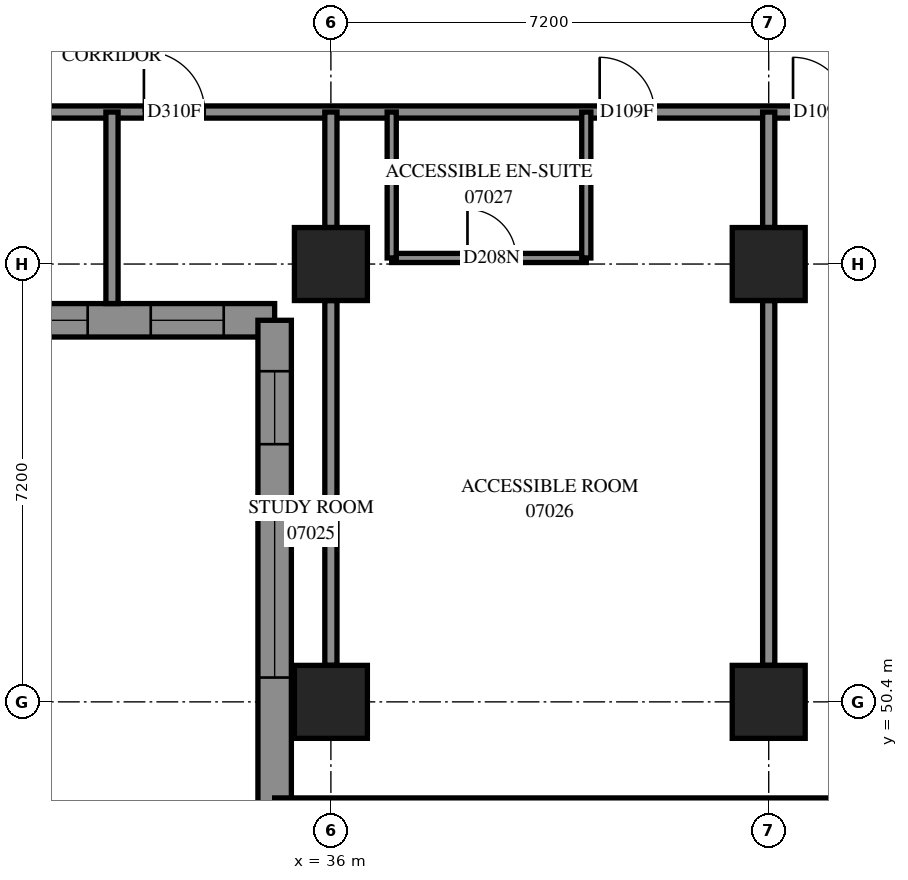
"""IFC4 building model, lengths in metres.
Left out: names, types, materials, properties, quantities, classifications, styles, units other than length and angle.
Written with IfcOpenShell. Run it as: python <this file> out.ifc"""

import sys

from ifc_helpers import new_model, si_unit, direction, frame, frame_2d, origin, origin_2d, place, context, subcontext, project, spatial, polyline, rectangle, outline, extrude, element, fill, save


model = new_model("IFC4")
c1 = context("Model", 3, precision=1e-05, world=origin(), true_north=direction((0.0, 1.0)))
c2 = subcontext(c1, "Body", "Model", "MODEL_VIEW")
j1 = project(units=[si_unit("LENGTHUNIT", "METRE"), si_unit("PLANEANGLEUNIT", "RADIAN")], contexts=[c1])
p1 = place(None, origin())
s1 = spatial("IfcSite", under=j1, at=p1, CompositionType="ELEMENT")
p2 = place(p1, origin())
s2 = spatial("IfcBuilding", under=s1, at=p2, CompositionType="ELEMENT")
p3 = place(p2, frame((0.0, 0.0, 30.4)))
s3 = spatial("IfcBuildingStorey", under=s2, at=p3, CompositionType="ELEMENT", Elevation=30.4)
for number, where, z_axis, x_axis in (
    (1, (36.0, 50.4, 0.0), (0.0, 0.0, 1.0), (1.0, 0.0, 0.0)),
    (2, (36.0, 57.6, 0.0), (0.0, 0.0, 1.0), (1.0, 0.0, 0.0)),
    (3, (43.2, 50.4, 0.0), (0.0, 0.0, 1.0), (1.0, 0.0, 0.0)),
    (4, (43.2, 57.6, 0.0), (0.0, 0.0, 1.0), (1.0, 0.0, 0.0)),
):
    element("IfcColumn", number, at=place(p3, frame(where, z_axis=z_axis, x_axis=x_axis)), inside=s3, PredefinedType="COLUMN", context=c2, shape_type="SweptSolid", body=[
        extrude(rectangle(XDim=1.2, YDim=1.2, at=origin_2d()), origin(), (0.0, 0.0, 1.0), 3.1),
    ])
p4 = place(p3, frame((27.875, 56.675, 0.0), z_axis=(0.0, 0.0, 1.0), x_axis=(1.0, 0.0, 0.0)))
e5 = element("IfcWall", 5, at=p4, inside=s3, PredefinedType="SOLIDWALL", context=c2, shape_type="SweptSolid", body=[
    extrude(outline(polyline([(-0.275, -0.275), (6.925, -0.275), (7.475, 0.275), (0.275, 0.275), (-0.275, -0.275)])), origin(), (0.0, 0.0, 1.0), 3.1),
])
p5 = place(p4, frame((1.325, 0.0, 0.5)))
e6 = element("IfcOpeningElement", 6, at=p5, cuts=e5, PredefinedType="OPENING", context=c2, shape_type="SweptSolid", body=[
    extrude(rectangle(XDim=2.8, YDim=2.45, at=frame_2d((1.4, 1.225))), frame((0.0, 0.285, 0.0), z_axis=(0.0, -1.0, 0.0), x_axis=(1.0, 0.0, 0.0)), (0.0, 0.0, 1.0), 0.57),
])
p6 = place(p4, frame((5.162, 0.0, 0.5)))
e7 = element("IfcOpeningElement", 7, at=p6, cuts=e5, PredefinedType="OPENING", context=c2, shape_type="SweptSolid", body=[
    extrude(rectangle(XDim=1.2, YDim=2.45, at=frame_2d((0.6, 1.225))), frame((0.0, 0.285, 0.0), z_axis=(0.0, -1.0, 0.0), x_axis=(1.0, 0.0, 0.0)), (0.0, 0.0, 1.0), 0.57),
])
p7 = place(p3, frame((35.075, 56.675, 0.0), z_axis=(0.0, 0.0, 1.0), x_axis=(0.0, -1.0, 0.0)))
e8 = element("IfcWall", 8, at=p7, inside=s3, PredefinedType="SOLIDWALL", context=c2, shape_type="SweptSolid", body=[
    extrude(outline(polyline([(0.275, -0.275), (8.405, -0.275), (7.855, 0.275), (-0.275, 0.275), (0.275, -0.275)])), origin(), (0.0, 0.0, 1.0), 3.1),
])
p8 = place(p7, frame((3.075, 0.0, 0.5)))
e9 = element("IfcOpeningElement", 9, at=p8, cuts=e8, PredefinedType="OPENING", context=c2, shape_type="SweptSolid", body=[
    extrude(rectangle(XDim=2.8, YDim=2.45, at=frame_2d((1.4, 1.225))), frame((0.0, 0.285, 0.0), z_axis=(0.0, -1.0, 0.0), x_axis=(1.0, 0.0, 0.0)), (0.0, 0.0, 1.0), 0.57),
])
p9 = place(p7, frame((0.838, 0.0, 0.5)))
e10 = element("IfcOpeningElement", 10, at=p9, cuts=e8, PredefinedType="OPENING", context=c2, shape_type="SweptSolid", body=[
    extrude(rectangle(XDim=1.2, YDim=2.45, at=frame_2d((0.6, 1.225))), frame((0.0, 0.285, 0.0), z_axis=(0.0, -1.0, 0.0), x_axis=(1.0, 0.0, 0.0)), (0.0, 0.0, 1.0), 0.57),
])
p10 = place(p3, frame((35.075, 48.545, 0.0), z_axis=(0.0, 0.0, 1.0), x_axis=(1.0, 0.0, 0.0)))
e11 = element("IfcWall", 11, at=p10, inside=s3, PredefinedType="SOLIDWALL", context=c2, shape_type="SweptSolid", body=[
    extrude(outline(polyline([(-0.275, -0.275), (14.125, -0.275), (14.675, 0.275), (0.275, 0.275), (-0.275, -0.275)])), origin(), (0.0, 0.0, 1.0), 3.1),
])
p11 = place(p10, frame((1.325, 0.0, 0.5)))
e12 = element("IfcOpeningElement", 12, at=p11, cuts=e11, PredefinedType="OPENING", context=c2, shape_type="SweptSolid", body=[
    extrude(rectangle(XDim=2.8, YDim=2.45, at=frame_2d((1.4, 1.225))), frame((0.0, 0.285, 0.0), z_axis=(0.0, -1.0, 0.0), x_axis=(1.0, 0.0, 0.0)), (0.0, 0.0, 1.0), 0.57),
])
p12 = place(p10, frame((4.925, 0.0, 0.5)))
e13 = element("IfcOpeningElement", 13, at=p12, cuts=e11, PredefinedType="OPENING", context=c2, shape_type="SweptSolid", body=[
    extrude(rectangle(XDim=2.8, YDim=2.45, at=frame_2d((1.4, 1.225))), frame((0.0, 0.285, 0.0), z_axis=(0.0, -1.0, 0.0), x_axis=(1.0, 0.0, 0.0)), (0.0, 0.0, 1.0), 0.57),
])
p13 = place(p10, frame((8.275, 0.0, 0.5)))
e14 = element("IfcOpeningElement", 14, at=p13, cuts=e11, PredefinedType="OPENING", context=c2, shape_type="SweptSolid", body=[
    extrude(rectangle(XDim=2.8, YDim=2.45, at=frame_2d((1.4, 1.225))), frame((0.0, 0.285, 0.0), z_axis=(0.0, -1.0, 0.0), x_axis=(1.0, 0.0, 0.0)), (0.0, 0.0, 1.0), 0.57),
])
p14 = place(p10, frame((12.363, 0.0, 0.5)))
e15 = element("IfcOpeningElement", 15, at=p14, cuts=e11, PredefinedType="OPENING", context=c2, shape_type="SweptSolid", body=[
    extrude(rectangle(XDim=1.2, YDim=2.45, at=frame_2d((0.6, 1.225))), frame((0.0, 0.285, 0.0), z_axis=(0.0, -1.0, 0.0), x_axis=(1.0, 0.0, 0.0)), (0.0, 0.0, 1.0), 0.57),
])
p15 = place(p3, frame((28.8, 60.1, 0.0), z_axis=(0.0, 0.0, 1.0), x_axis=(1.0, 0.0, 0.0)))
e16 = element("IfcWall", 16, at=p15, inside=s3, PredefinedType="PARTITIONING", context=c2, shape_type="SweptSolid", body=[
    extrude(rectangle(XDim=24.1, YDim=0.2, at=frame_2d((12.05, 0.0))), origin(), (0.0, 0.0, 1.0), 3.1),
])
p16 = place(p15, frame((4.125, 0.0, 0.0)))
e17 = element("IfcOpeningElement", 17, at=p16, cuts=e16, PredefinedType="OPENING", context=c2, shape_type="SweptSolid", body=[
    extrude(rectangle(XDim=1.0, YDim=2.1, at=frame_2d((0.5, 1.05))), frame((0.0, 0.11, 0.0), z_axis=(0.0, -1.0, 0.0), x_axis=(1.0, 0.0, 0.0)), (0.0, 0.0, 1.0), 0.22),
])
p17 = place(p15, frame((11.62, 0.0, 0.0)))
e18 = element("IfcOpeningElement", 18, at=p17, cuts=e16, PredefinedType="OPENING", context=c2, shape_type="SweptSolid", body=[
    extrude(rectangle(XDim=0.9, YDim=2.1, at=frame_2d((0.45, 1.05))), frame((0.0, 0.11, 0.0), z_axis=(0.0, -1.0, 0.0), x_axis=(1.0, 0.0, 0.0)), (0.0, 0.0, 1.0), 0.22),
])
p18 = place(p15, frame((14.8, 0.0, 0.0)))
e19 = element("IfcOpeningElement", 19, at=p18, cuts=e16, PredefinedType="OPENING", context=c2, shape_type="SweptSolid", body=[
    extrude(rectangle(XDim=0.9, YDim=2.1, at=frame_2d((0.45, 1.05))), frame((0.0, 0.11, 0.0), z_axis=(0.0, -1.0, 0.0), x_axis=(1.0, 0.0, 0.0)), (0.0, 0.0, 1.0), 0.22),
])
p19 = place(p15, frame((18.835, 0.0, 0.0)))
e20 = element("IfcOpeningElement", 20, at=p19, cuts=e16, PredefinedType="OPENING", context=c2, shape_type="SweptSolid", body=[
    extrude(rectangle(XDim=1.0, YDim=2.1, at=frame_2d((0.5, 1.05))), frame((0.0, 0.11, 0.0), z_axis=(0.0, -1.0, 0.0), x_axis=(1.0, 0.0, 0.0)), (0.0, 0.0, 1.0), 0.22),
])
p20 = place(p15, frame((22.854, 0.0, 0.0)))
e21 = element("IfcOpeningElement", 21, at=p20, cuts=e16, PredefinedType="OPENING", context=c2, shape_type="SweptSolid", body=[
    extrude(rectangle(XDim=1.0, YDim=2.1, at=frame_2d((0.5, 1.05))), frame((0.0, 0.11, 0.0), z_axis=(0.0, -1.0, 0.0), x_axis=(1.0, 0.0, 0.0)), (0.0, 0.0, 1.0), 0.22),
])
p21 = place(p3, frame((36.0, 51.0, 0.0), z_axis=(0.0, 0.0, 1.0), x_axis=(0.0, 1.0, 0.0)))
e22 = element("IfcWall", 22, at=p21, inside=s3, PredefinedType="PARTITIONING", context=c2, shape_type="SweptSolid", body=[
    extrude(rectangle(XDim=6.0, YDim=0.2, at=frame_2d((3.0, 0.0))), origin(), (0.0, 0.0, 1.0), 2.6),
])
p22 = place(p3, frame((43.2, 51.0, 0.0), z_axis=(0.0, 0.0, 1.0), x_axis=(0.0, 1.0, 0.0)))
e23 = element("IfcWall", 23, at=p22, inside=s3, PredefinedType="PARTITIONING", context=c2, shape_type="SweptSolid", body=[
    extrude(rectangle(XDim=6.0, YDim=0.2, at=frame_2d((3.0, 0.0))), origin(), (0.0, 0.0, 1.0), 3.1),
])
p23 = place(p3, frame((37.0, 57.7, 0.0), z_axis=(0.0, 0.0, 1.0), x_axis=(1.0, 0.0, 0.0)))
e24 = element("IfcWall", 24, at=p23, inside=s3, PredefinedType="PARTITIONING", context=c2, shape_type="SweptSolid", body=[
    extrude(rectangle(XDim=3.2, YDim=0.15, at=frame_2d((1.6, 0.0))), origin(), (0.0, 0.0, 1.0), 3.1),
])
p24 = place(p23, frame((1.246, 0.0, 0.0)))
e25 = element("IfcOpeningElement", 25, at=p24, cuts=e24, PredefinedType="OPENING", context=c2, shape_type="SweptSolid", body=[
    extrude(rectangle(XDim=0.8, YDim=2.1, at=frame_2d((0.4, 1.05))), frame((0.0, 0.085, 0.0), z_axis=(0.0, -1.0, 0.0), x_axis=(1.0, 0.0, 0.0)), (0.0, 0.0, 1.0), 0.17),
])
p25 = place(p3, frame((32.4, 56.95, 0.0), z_axis=(0.0, 0.0, 1.0), x_axis=(0.0, 1.0, 0.0)))
e26 = element("IfcWall", 26, at=p25, inside=s3, PredefinedType="PARTITIONING", context=c2, shape_type="SweptSolid", body=[
    extrude(rectangle(XDim=3.15, YDim=0.2, at=frame_2d((1.575, 0.0))), origin(), (0.0, 0.0, 1.0), 3.1),
])
for number, where, z_axis, x_axis in (
    (27, (40.2, 57.7, 0.0), (0.0, 0.0, 1.0), (0.0, 1.0, 0.0)),
    (28, (37.0, 57.7, 0.0), (0.0, 0.0, 1.0), (0.0, 1.0, 0.0)),
):
    element("IfcWall", number, at=place(p3, frame(where, z_axis=z_axis, x_axis=x_axis)), inside=s3, PredefinedType="PARTITIONING", context=c2, shape_type="SweptSolid", body=[
        extrude(rectangle(XDim=2.4, YDim=0.15, at=frame_2d((1.2, 0.0))), origin(), (0.0, 0.0, 1.0), 3.1),
    ])
for number, where, z_axis, x_axis in (
    (29, (36.0, 58.2, 0.0), (0.0, 0.0, 1.0), (0.0, 1.0, 0.0)),
    (30, (43.2, 58.2, 0.0), (0.0, 0.0, 1.0), (0.0, 1.0, 0.0)),
):
    element("IfcWall", number, at=place(p3, frame(where, z_axis=z_axis, x_axis=x_axis)), inside=s3, PredefinedType="PARTITIONING", context=c2, shape_type="SweptSolid", body=[
        extrude(rectangle(XDim=1.9, YDim=0.2, at=frame_2d((0.95, 0.0))), origin(), (0.0, 0.0, 1.0), 3.1),
    ])
p26 = place(p5, origin())
e31 = element("IfcWindow", 31, at=p26, inside=s3, PartitioningType="SINGLE_PANEL", PredefinedType="WINDOW", context=c2, shape_type="SweptSolid", body=[
    extrude(rectangle(XDim=2.8, YDim=2.45, at=frame_2d((1.4, 1.225))), frame((0.0, 0.155, 0.0), z_axis=(0.0, -1.0, 0.0), x_axis=(1.0, 0.0, 0.0)), (0.0, 0.0, 1.0), 0.06),
])
fill(e6, e31)
p27 = place(p6, origin())
e32 = element("IfcWindow", 32, at=p27, inside=s3, PartitioningType="SINGLE_PANEL", PredefinedType="WINDOW", context=c2, shape_type="SweptSolid", body=[
    extrude(rectangle(XDim=1.2, YDim=2.45, at=frame_2d((0.6, 1.225))), frame((0.0, 0.155, 0.0), z_axis=(0.0, -1.0, 0.0), x_axis=(1.0, 0.0, 0.0)), (0.0, 0.0, 1.0), 0.06),
])
fill(e7, e32)
p28 = place(p8, origin())
e33 = element("IfcWindow", 33, at=p28, inside=s3, PartitioningType="SINGLE_PANEL", PredefinedType="WINDOW", context=c2, shape_type="SweptSolid", body=[
    extrude(rectangle(XDim=2.8, YDim=2.45, at=frame_2d((1.4, 1.225))), frame((0.0, 0.155, 0.0), z_axis=(0.0, -1.0, 0.0), x_axis=(1.0, 0.0, 0.0)), (0.0, 0.0, 1.0), 0.06),
])
fill(e9, e33)
p29 = place(p9, origin())
e34 = element("IfcWindow", 34, at=p29, inside=s3, PartitioningType="SINGLE_PANEL", PredefinedType="WINDOW", context=c2, shape_type="SweptSolid", body=[
    extrude(rectangle(XDim=1.2, YDim=2.45, at=frame_2d((0.6, 1.225))), frame((0.0, 0.155, 0.0), z_axis=(0.0, -1.0, 0.0), x_axis=(1.0, 0.0, 0.0)), (0.0, 0.0, 1.0), 0.06),
])
fill(e10, e34)
p30 = place(p16, origin())
e35 = element("IfcDoor", 35, at=p30, inside=s3, OperationType="SINGLE_SWING_RIGHT", PredefinedType="DOOR", context=c2, shape_type="SweptSolid", body=[
    extrude(rectangle(XDim=1.0, YDim=2.1, at=frame_2d((0.5, 1.05))), frame((0.0, 0.025, 0.0), z_axis=(0.0, -1.0, 0.0), x_axis=(1.0, 0.0, 0.0)), (0.0, 0.0, 1.0), 0.05),
])
fill(e17, e35)
p31 = place(p17, origin())
e36 = element("IfcDoor", 36, at=p31, inside=s3, OperationType="SINGLE_SWING_LEFT", PredefinedType="DOOR", context=c2, shape_type="SweptSolid", body=[
    extrude(rectangle(XDim=0.9, YDim=2.1, at=frame_2d((0.45, 1.05))), frame((0.0, 0.025, 0.0), z_axis=(0.0, -1.0, 0.0), x_axis=(1.0, 0.0, 0.0)), (0.0, 0.0, 1.0), 0.05),
])
fill(e18, e36)
p32 = place(p24, origin())
e37 = element("IfcDoor", 37, at=p32, inside=s3, OperationType="SINGLE_SWING_RIGHT", PredefinedType="DOOR", context=c2, shape_type="SweptSolid", body=[
    extrude(rectangle(XDim=0.8, YDim=2.1, at=frame_2d((0.4, 1.05))), frame((0.0, 0.025, 0.0), z_axis=(0.0, -1.0, 0.0), x_axis=(1.0, 0.0, 0.0)), (0.0, 0.0, 1.0), 0.05),
])
fill(e25, e37)
p33 = place(p18, origin())
e38 = element("IfcDoor", 38, at=p33, inside=s3, OperationType="SINGLE_SWING_LEFT", PredefinedType="DOOR", context=c2, shape_type="SweptSolid", body=[
    extrude(rectangle(XDim=0.9, YDim=2.1, at=frame_2d((0.45, 1.05))), frame((0.0, 0.025, 0.0), z_axis=(0.0, -1.0, 0.0), x_axis=(1.0, 0.0, 0.0)), (0.0, 0.0, 1.0), 0.05),
])
fill(e19, e38)
save(model, sys.argv[1])
